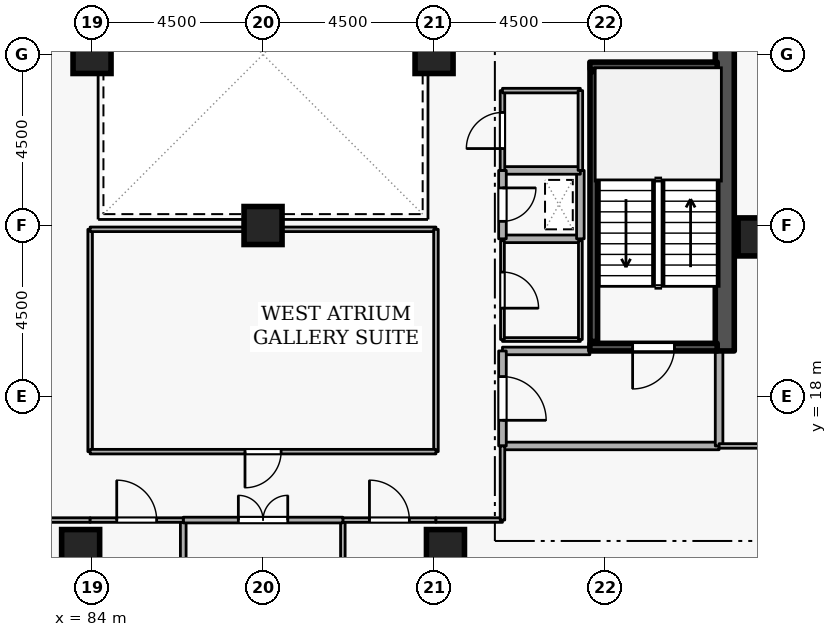
"""IFC4 building model, lengths in metres.
Left out: names, types, materials, properties, quantities, classifications, styles, units other than length and angle.
Written with IfcOpenShell. Run it as: python <this file> out.ifc"""

import sys

from ifc_helpers import new_model, si_unit, direction, frame, frame_2d, origin, origin_2d, place, context, subcontext, project, spatial, rectangle, extrude, element, fill, save


model = new_model("IFC4")
c1 = context("Model", 3, precision=1e-05, world=origin(), true_north=direction((0.0, 1.0)))
c2 = subcontext(c1, "Body", "Model", "MODEL_VIEW")
j1 = project(units=[si_unit("LENGTHUNIT", "METRE"), si_unit("PLANEANGLEUNIT", "RADIAN")], contexts=[c1])
p1 = place(None, origin())
s1 = spatial("IfcSite", under=j1, at=p1, CompositionType="ELEMENT")
p2 = place(p1, origin())
s2 = spatial("IfcBuilding", under=s1, at=p2, CompositionType="ELEMENT")
p3 = place(p2, frame((0.0, 0.0, 233.1)))
s3 = spatial("IfcBuildingStorey", under=s2, at=p3, CompositionType="ELEMENT", Elevation=233.1)
p4 = place(p3, frame((100.65, 19.2, 0.0), z_axis=(0.0, 0.0, 1.0), x_axis=(0.0, 1.0, 0.0)))
e1 = element("IfcWall", 1, at=p4, inside=s3, PredefinedType="SHEAR", context=c2, shape_type="SweptSolid", body=[
    extrude(rectangle(XDim=15.6, YDim=0.5, at=frame_2d((7.8, 0.0))), origin(), (0.0, 0.0, 1.0), 3.6),
])
for number, where, z_axis, x_axis in (
    (2, (93.3, 14.0, 0.0), (0.0, 0.0, 1.0), (1.0, 0.0, 0.0)),
    (3, (83.7, 14.0, 0.0), (0.0, 0.0, 1.0), (1.0, 0.0, 0.0)),
    (4, (101.5, 22.2, 0.0), (0.0, 0.0, 1.0), (1.0, 0.0, 0.0)),
    (5, (93.0, 27.0, 0.0), (0.0, 0.0, 1.0), (1.0, 0.0, 0.0)),
    (6, (84.0, 27.0, 0.0), (0.0, 0.0, 1.0), (1.0, 0.0, 0.0)),
    (7, (88.5, 22.5, 0.0), (0.0, 0.0, 1.0), (1.0, 0.0, 0.0)),
):
    element("IfcColumn", number, at=place(p3, frame(where, z_axis=z_axis, x_axis=x_axis)), inside=s3, PredefinedType="COLUMN", context=c2, shape_type="SweptSolid", body=[
        extrude(rectangle(XDim=1.0, YDim=1.0, at=origin_2d()), origin(), (0.0, 0.0, 1.0), 3.6),
    ])
p5 = place(p3, frame((100.45, 19.3, 0.0), z_axis=(0.0, 0.0, 1.0), x_axis=(-1.0, 0.0, 0.0)))
e8 = element("IfcWall", 8, at=p5, inside=s3, PredefinedType="SHEAR", context=c2, shape_type="SweptSolid", body=[
    extrude(rectangle(XDim=3.35, YDim=0.2, at=frame_2d((1.675, 0.0))), origin(), (0.0, 0.0, 1.0), 3.6),
])
p6 = place(p5, frame((1.125, 0.0, 0.0)))
e9 = element("IfcOpeningElement", 9, at=p6, cuts=e8, PredefinedType="OPENING", context=c2, shape_type="SweptSolid", body=[
    extrude(rectangle(XDim=1.1, YDim=2.1, at=frame_2d((0.55, 1.05))), frame((0.0, 0.11, 0.0), z_axis=(0.0, -1.0, 0.0), x_axis=(1.0, 0.0, 0.0)), (0.0, 0.0, 1.0), 0.22),
])
p7 = place(p3, frame((97.1, 26.7, 0.0), z_axis=(0.0, 0.0, 1.0), x_axis=(1.0, 0.0, 0.0)))
e10 = element("IfcWall", 10, at=p7, inside=s3, PredefinedType="SHEAR", context=c2, shape_type="SweptSolid", body=[
    extrude(rectangle(XDim=3.35, YDim=0.2, at=frame_2d((1.675, 0.0))), origin(), (0.0, 0.0, 1.0), 3.6),
])
p8 = place(p3, frame((97.203, 26.55, 0.0), z_axis=(0.0, 0.0, 1.0), x_axis=(0.0, -1.0, 0.0)))
e11 = element("IfcWall", 11, at=p8, inside=s3, PredefinedType="SHEAR", context=c2, shape_type="SweptSolid", body=[
    extrude(rectangle(XDim=7.1, YDim=0.2, at=frame_2d((3.55, 0.0))), origin(), (0.0, 0.0, 1.0), 3.6),
])
p9 = place(p3, frame((94.8, 16.7, 0.0), z_axis=(0.0, 0.0, 1.0), x_axis=(1.0, 0.0, 0.0)))
e12 = element("IfcWall", 12, at=p9, inside=s3, PredefinedType="STANDARD", context=c2, shape_type="SweptSolid", body=[
    extrude(rectangle(XDim=5.7, YDim=0.2, at=frame_2d((2.85, 0.0))), origin(), (0.0, 0.0, 1.0), 3.34),
])
p10 = place(p3, frame((100.5, 16.7, 0.0), z_axis=(0.0, 0.0, 1.0), x_axis=(0.0, 1.0, 0.0)))
e13 = element("IfcWall", 13, at=p10, inside=s3, PredefinedType="STANDARD", context=c2, shape_type="SweptSolid", body=[
    extrude(rectangle(XDim=2.5, YDim=0.2, at=frame_2d((1.25, 0.0))), origin(), (0.0, 0.0, 1.0), 3.34),
])
p11 = place(p3, frame((97.1, 19.2, 0.0), z_axis=(0.0, 0.0, 1.0), x_axis=(-1.0, 0.0, 0.0)))
e14 = element("IfcWall", 14, at=p11, inside=s3, PredefinedType="STANDARD", context=c2, shape_type="SweptSolid", body=[
    extrude(rectangle(XDim=2.3, YDim=0.2, at=frame_2d((1.15, 0.0))), origin(), (0.0, 0.0, 1.0), 2.545),
])
p12 = place(p3, frame((94.8, 19.2, 0.0), z_axis=(0.0, 0.0, 1.0), x_axis=(0.0, -1.0, 0.0)))
e15 = element("IfcWall", 15, at=p12, inside=s3, PredefinedType="STANDARD", context=c2, shape_type="SweptSolid", body=[
    extrude(rectangle(XDim=2.5, YDim=0.2, at=frame_2d((1.25, 0.0))), origin(), (0.0, 0.0, 1.0), 3.34),
])
p13 = place(p12, frame((0.675, 0.0, 0.0)))
e16 = element("IfcOpeningElement", 16, at=p13, cuts=e15, PredefinedType="OPENING", context=c2, shape_type="SweptSolid", body=[
    extrude(rectangle(XDim=1.15, YDim=2.1, at=frame_2d((0.575, 1.05))), frame((0.0, 0.11, 0.0), z_axis=(0.0, -1.0, 0.0), x_axis=(1.0, 0.0, 0.0)), (0.0, 0.0, 1.0), 0.22),
])
p14 = place(p3, frame((94.8, 22.15, 0.0), z_axis=(0.0, 0.0, 1.0), x_axis=(1.0, 0.0, 0.0)))
e17 = element("IfcWall", 17, at=p14, inside=s3, PredefinedType="STANDARD", context=c2, shape_type="SweptSolid", body=[
    extrude(rectangle(XDim=2.05, YDim=0.2, at=frame_2d((1.025, 0.0))), origin(), (0.0, 0.0, 1.0), 3.34),
])
p15 = place(p3, frame((96.85, 22.15, 0.0), z_axis=(0.0, 0.0, 1.0), x_axis=(0.0, 1.0, 0.0)))
e18 = element("IfcWall", 18, at=p15, inside=s3, PredefinedType="STANDARD", context=c2, shape_type="SweptSolid", body=[
    extrude(rectangle(XDim=1.8, YDim=0.2, at=frame_2d((0.9, 0.0))), origin(), (0.0, 0.0, 1.0), 3.34),
])
p16 = place(p3, frame((96.85, 23.95, 0.0), z_axis=(0.0, 0.0, 1.0), x_axis=(-1.0, 0.0, 0.0)))
e19 = element("IfcWall", 19, at=p16, inside=s3, PredefinedType="STANDARD", context=c2, shape_type="SweptSolid", body=[
    extrude(rectangle(XDim=2.05, YDim=0.2, at=frame_2d((1.025, 0.0))), origin(), (0.0, 0.0, 1.0), 3.34),
])
p17 = place(p3, frame((94.8, 23.95, 0.0), z_axis=(0.0, 0.0, 1.0), x_axis=(0.0, -1.0, 0.0)))
e20 = element("IfcWall", 20, at=p17, inside=s3, PredefinedType="STANDARD", context=c2, shape_type="SweptSolid", body=[
    extrude(rectangle(XDim=1.8, YDim=0.2, at=frame_2d((0.9, 0.0))), origin(), (0.0, 0.0, 1.0), 3.34),
])
p18 = place(p17, frame((0.46, 0.0, 0.0)))
e21 = element("IfcOpeningElement", 21, at=p18, cuts=e20, PredefinedType="OPENING", context=c2, shape_type="SweptSolid", body=[
    extrude(rectangle(XDim=0.88, YDim=2.04, at=frame_2d((0.44, 1.02))), frame((0.0, 0.11, 0.0), z_axis=(0.0, -1.0, 0.0), x_axis=(1.0, 0.0, 0.0)), (0.0, 0.0, 1.0), 0.22),
])
p19 = place(p3, frame((94.8, 19.5, 0.0), z_axis=(0.0, 0.0, 1.0), x_axis=(1.0, 0.0, 0.0)))
e22 = element("IfcWall", 22, at=p19, inside=s3, PredefinedType="PARTITIONING", context=c2, shape_type="SweptSolid", body=[
    extrude(rectangle(XDim=2.05, YDim=0.1, at=frame_2d((1.025, 0.0))), origin(), (0.0, 0.0, 1.0), 2.545),
])
p20 = place(p3, frame((96.85, 19.5, 0.0), z_axis=(0.0, 0.0, 1.0), x_axis=(0.0, 1.0, 0.0)))
e23 = element("IfcWall", 23, at=p20, inside=s3, PredefinedType="PARTITIONING", context=c2, shape_type="SweptSolid", body=[
    extrude(rectangle(XDim=2.6, YDim=0.1, at=frame_2d((1.3, 0.0))), origin(), (0.0, 0.0, 1.0), 3.34),
])
p21 = place(p3, frame((94.8, 22.1, 0.0), z_axis=(0.0, 0.0, 1.0), x_axis=(0.0, -1.0, 0.0)))
e24 = element("IfcWall", 24, at=p21, inside=s3, PredefinedType="PARTITIONING", context=c2, shape_type="SweptSolid", body=[
    extrude(rectangle(XDim=2.6, YDim=0.1, at=frame_2d((1.3, 0.0))), origin(), (0.0, 0.0, 1.0), 3.34),
])
p22 = place(p21, frame((0.825, 0.0, 0.0)))
e25 = element("IfcOpeningElement", 25, at=p22, cuts=e24, PredefinedType="OPENING", context=c2, shape_type="SweptSolid", body=[
    extrude(rectangle(XDim=0.95, YDim=2.1, at=frame_2d((0.475, 1.05))), frame((0.0, 0.06, 0.0), z_axis=(0.0, -1.0, 0.0), x_axis=(1.0, 0.0, 0.0)), (0.0, 0.0, 1.0), 0.12),
])
p23 = place(p3, frame((94.8, 23.95, 0.0), z_axis=(0.0, 0.0, 1.0), x_axis=(0.0, 1.0, 0.0)))
e26 = element("IfcWall", 26, at=p23, inside=s3, PredefinedType="PARTITIONING", context=c2, shape_type="SweptSolid", body=[
    extrude(rectangle(XDim=2.1, YDim=0.12, at=frame_2d((1.05, 0.0))), origin(), (0.0, 0.0, 1.0), 3.34),
])
p24 = place(p23, frame((0.575, 0.0, 0.0)))
e27 = element("IfcOpeningElement", 27, at=p24, cuts=e26, PredefinedType="OPENING", context=c2, shape_type="SweptSolid", body=[
    extrude(rectangle(XDim=0.95, YDim=2.1, at=frame_2d((0.475, 1.05))), frame((0.0, 0.07, 0.0), z_axis=(0.0, -1.0, 0.0), x_axis=(1.0, 0.0, 0.0)), (0.0, 0.0, 1.0), 0.14),
])
p25 = place(p3, frame((94.8, 26.05, 0.0), z_axis=(0.0, 0.0, 1.0), x_axis=(1.0, 0.0, 0.0)))
e28 = element("IfcWall", 28, at=p25, inside=s3, PredefinedType="PARTITIONING", context=c2, shape_type="SweptSolid", body=[
    extrude(rectangle(XDim=2.05, YDim=0.12, at=frame_2d((1.025, 0.0))), origin(), (0.0, 0.0, 1.0), 3.34),
])
p26 = place(p3, frame((96.85, 26.05, 0.0), z_axis=(0.0, 0.0, 1.0), x_axis=(0.0, -1.0, 0.0)))
e29 = element("IfcWall", 29, at=p26, inside=s3, PredefinedType="PARTITIONING", context=c2, shape_type="SweptSolid", body=[
    extrude(rectangle(XDim=2.1, YDim=0.12, at=frame_2d((1.05, 0.0))), origin(), (0.0, 0.0, 1.0), 3.34),
])
p27 = place(p3, frame((90.6, 3.28, 0.0), z_axis=(0.0, 0.0, 1.0), x_axis=(0.0, 1.0, 0.0)))
e30 = element("IfcWall", 30, at=p27, inside=s3, PredefinedType="PARTITIONING", context=c2, shape_type="SweptSolid", body=[
    extrude(rectangle(XDim=11.47, YDim=0.12, at=frame_2d((5.735, 0.0))), origin(), (0.0, 0.0, 1.0), 3.34),
])
p28 = place(p3, frame((90.6, 14.75, 0.0), z_axis=(0.0, 0.0, 1.0), x_axis=(1.0, 0.0, 0.0)))
e31 = element("IfcWall", 31, at=p28, inside=s3, PredefinedType="PARTITIONING", context=c2, shape_type="SweptSolid", body=[
    extrude(rectangle(XDim=2.45, YDim=0.12, at=frame_2d((1.225, 0.0))), origin(), (0.0, 0.0, 1.0), 3.34),
])
p29 = place(p28, frame((0.7, 0.0, 0.0)))
e32 = element("IfcOpeningElement", 32, at=p29, cuts=e31, PredefinedType="OPENING", context=c2, shape_type="SweptSolid", body=[
    extrude(rectangle(XDim=1.05, YDim=2.1, at=frame_2d((0.525, 1.05))), frame((0.0, 0.07, 0.0), z_axis=(0.0, -1.0, 0.0), x_axis=(1.0, 0.0, 0.0)), (0.0, 0.0, 1.0), 0.14),
])
p30 = place(p3, frame((93.05, 14.75, 0.0), z_axis=(0.0, 0.0, 1.0), x_axis=(1.0, 0.0, 0.0)))
e33 = element("IfcWall", 33, at=p30, inside=s3, PredefinedType="PARTITIONING", context=c2, shape_type="SweptSolid", body=[
    extrude(rectangle(XDim=1.75, YDim=0.12, at=frame_2d((0.875, 0.0))), origin(), (0.0, 0.0, 1.0), 3.34),
])
p31 = place(p3, frame((94.8, 14.75, 0.0), z_axis=(0.0, 0.0, 1.0), x_axis=(0.0, 1.0, 0.0)))
e34 = element("IfcWall", 34, at=p31, inside=s3, PredefinedType="PARTITIONING", context=c2, shape_type="SweptSolid", body=[
    extrude(rectangle(XDim=1.95, YDim=0.12, at=frame_2d((0.975, 0.0))), origin(), (0.0, 0.0, 1.0), 3.34),
])
p32 = place(p3, frame((100.5, 16.7, 0.0), z_axis=(0.0, 0.0, 1.0), x_axis=(1.0, 0.0, 0.0)))
e35 = element("IfcWall", 35, at=p32, inside=s3, PredefinedType="PARTITIONING", context=c2, shape_type="SweptSolid", body=[
    extrude(rectangle(XDim=11.72, YDim=0.12, at=frame_2d((5.86, 0.0))), origin(), (0.0, 0.0, 1.0), 3.34),
])
p33 = place(p3, frame((86.4, 3.28, 0.0), z_axis=(0.0, 0.0, 1.0), x_axis=(0.0, 1.0, 0.0)))
e36 = element("IfcWall", 36, at=p33, inside=s3, PredefinedType="PARTITIONING", context=c2, shape_type="SweptSolid", body=[
    extrude(rectangle(XDim=11.47, YDim=0.15, at=frame_2d((5.735, 0.0))), origin(), (0.0, 0.0, 1.0), 3.34),
])
p34 = place(p3, frame((86.4, 14.75, 0.0), z_axis=(0.0, 0.0, 1.0), x_axis=(1.0, 0.0, 0.0)))
e37 = element("IfcWall", 37, at=p34, inside=s3, PredefinedType="PARTITIONING", context=c2, shape_type="SweptSolid", body=[
    extrude(rectangle(XDim=4.2, YDim=0.15, at=frame_2d((2.1, 0.0))), origin(), (0.0, 0.0, 1.0), 3.34),
])
p35 = place(p34, frame((1.45, 0.0, 0.0)))
e38 = element("IfcOpeningElement", 38, at=p35, cuts=e37, PredefinedType="OPENING", context=c2, shape_type="SweptSolid", body=[
    extrude(rectangle(XDim=1.3, YDim=2.12, at=frame_2d((0.65, 1.06))), frame((0.0, 0.085, 0.0), z_axis=(0.0, -1.0, 0.0), x_axis=(1.0, 0.0, 0.0)), (0.0, 0.0, 1.0), 0.17),
])
p36 = place(p3, frame((82.2, 14.75, 0.0), z_axis=(0.0, 0.0, 1.0), x_axis=(1.0, 0.0, 0.0)))
e39 = element("IfcWall", 39, at=p36, inside=s3, PredefinedType="PARTITIONING", context=c2, shape_type="SweptSolid", body=[
    extrude(rectangle(XDim=1.75, YDim=0.12, at=frame_2d((0.875, 0.0))), origin(), (0.0, 0.0, 1.0), 3.34),
])
p37 = place(p3, frame((83.95, 14.75, 0.0), z_axis=(0.0, 0.0, 1.0), x_axis=(1.0, 0.0, 0.0)))
e40 = element("IfcWall", 40, at=p37, inside=s3, PredefinedType="PARTITIONING", context=c2, shape_type="SweptSolid", body=[
    extrude(rectangle(XDim=2.45, YDim=0.12, at=frame_2d((1.225, 0.0))), origin(), (0.0, 0.0, 1.0), 3.34),
])
p38 = place(p37, frame((0.7, 0.0, 0.0)))
e41 = element("IfcOpeningElement", 41, at=p38, cuts=e40, PredefinedType="OPENING", context=c2, shape_type="SweptSolid", body=[
    extrude(rectangle(XDim=1.05, YDim=2.1, at=frame_2d((0.525, 1.05))), frame((0.0, 0.07, 0.0), z_axis=(0.0, -1.0, 0.0), x_axis=(1.0, 0.0, 0.0)), (0.0, 0.0, 1.0), 0.14),
])
p39 = place(p3, frame((83.95, 16.55, 0.0), z_axis=(0.0, 0.0, 1.0), x_axis=(0.0, 1.0, 0.0)))
e42 = element("IfcWall", 42, at=p39, inside=s3, PredefinedType="PARTITIONING", context=c2, shape_type="SweptSolid", body=[
    extrude(rectangle(XDim=5.85, YDim=0.12, at=frame_2d((2.925, 0.0))), origin(), (0.0, 0.0, 1.0), 3.34),
])
p40 = place(p3, frame((83.95, 22.4, 0.0), z_axis=(0.0, 0.0, 1.0), x_axis=(1.0, 0.0, 0.0)))
e43 = element("IfcWall", 43, at=p40, inside=s3, PredefinedType="PARTITIONING", context=c2, shape_type="SweptSolid", body=[
    extrude(rectangle(XDim=9.1, YDim=0.12, at=frame_2d((4.55, 0.0))), origin(), (0.0, 0.0, 1.0), 3.34),
])
p41 = place(p3, frame((93.05, 22.4, 0.0), z_axis=(0.0, 0.0, 1.0), x_axis=(0.0, -1.0, 0.0)))
e44 = element("IfcWall", 44, at=p41, inside=s3, PredefinedType="PARTITIONING", context=c2, shape_type="SweptSolid", body=[
    extrude(rectangle(XDim=5.85, YDim=0.12, at=frame_2d((2.925, 0.0))), origin(), (0.0, 0.0, 1.0), 3.34),
])
p42 = place(p3, frame((93.05, 16.55, 0.0), z_axis=(0.0, 0.0, 1.0), x_axis=(-1.0, 0.0, 0.0)))
e45 = element("IfcWall", 45, at=p42, inside=s3, PredefinedType="PARTITIONING", context=c2, shape_type="SweptSolid", body=[
    extrude(rectangle(XDim=9.1, YDim=0.12, at=frame_2d((4.55, 0.0))), origin(), (0.0, 0.0, 1.0), 3.34),
])
p43 = place(p42, frame((4.075, 0.0, 0.0)))
e46 = element("IfcOpeningElement", 46, at=p43, cuts=e45, PredefinedType="OPENING", context=c2, shape_type="SweptSolid", body=[
    extrude(rectangle(XDim=0.95, YDim=2.1, at=frame_2d((0.475, 1.05))), frame((0.0, 0.07, 0.0), z_axis=(0.0, -1.0, 0.0), x_axis=(1.0, 0.0, 0.0)), (0.0, 0.0, 1.0), 0.14),
])
p44 = place(p6, origin())
e47 = element("IfcDoor", 47, at=p44, inside=s3, OperationType="SINGLE_SWING_RIGHT", PredefinedType="DOOR", context=c2, shape_type="SweptSolid", body=[
    extrude(rectangle(XDim=1.1, YDim=2.1, at=frame_2d((0.55, 1.05))), frame((0.0, 0.025, 0.0), z_axis=(0.0, -1.0, 0.0), x_axis=(1.0, 0.0, 0.0)), (0.0, 0.0, 1.0), 0.05),
])
fill(e9, e47)
p45 = place(p13, origin())
e48 = element("IfcDoor", 48, at=p45, inside=s3, OperationType="SINGLE_SWING_RIGHT", PredefinedType="DOOR", context=c2, shape_type="SweptSolid", body=[
    extrude(rectangle(XDim=1.15, YDim=2.1, at=frame_2d((0.575, 1.05))), frame((0.0, 0.025, 0.0), z_axis=(0.0, -1.0, 0.0), x_axis=(1.0, 0.0, 0.0)), (0.0, 0.0, 1.0), 0.05),
])
fill(e16, e48)
p46 = place(p18, origin())
e49 = element("IfcDoor", 49, at=p46, inside=s3, OperationType="SINGLE_SWING_LEFT", PredefinedType="DOOR", context=c2, shape_type="SweptSolid", body=[
    extrude(rectangle(XDim=0.88, YDim=2.04, at=frame_2d((0.44, 1.02))), frame((0.0, 0.025, 0.0), z_axis=(0.0, -1.0, 0.0), x_axis=(1.0, 0.0, 0.0)), (0.0, 0.0, 1.0), 0.05),
])
fill(e21, e49)
p47 = place(p22, origin())
e50 = element("IfcDoor", 50, at=p47, inside=s3, OperationType="SINGLE_SWING_RIGHT", PredefinedType="DOOR", context=c2, shape_type="SweptSolid", body=[
    extrude(rectangle(XDim=0.95, YDim=2.1, at=frame_2d((0.475, 1.05))), frame((0.0, 0.025, 0.0), z_axis=(0.0, -1.0, 0.0), x_axis=(1.0, 0.0, 0.0)), (0.0, 0.0, 1.0), 0.05),
])
fill(e25, e50)
p48 = place(p24, origin())
e51 = element("IfcDoor", 51, at=p48, inside=s3, OperationType="SINGLE_SWING_LEFT", PredefinedType="DOOR", context=c2, shape_type="SweptSolid", body=[
    extrude(rectangle(XDim=0.95, YDim=2.1, at=frame_2d((0.475, 1.05))), frame((0.0, 0.025, 0.0), z_axis=(0.0, -1.0, 0.0), x_axis=(1.0, 0.0, 0.0)), (0.0, 0.0, 1.0), 0.05),
])
fill(e27, e51)
p49 = place(p29, origin())
e52 = element("IfcDoor", 52, at=p49, inside=s3, OperationType="SINGLE_SWING_LEFT", PredefinedType="DOOR", context=c2, shape_type="SweptSolid", body=[
    extrude(rectangle(XDim=1.05, YDim=2.1, at=frame_2d((0.525, 1.05))), frame((0.0, 0.025, 0.0), z_axis=(0.0, -1.0, 0.0), x_axis=(1.0, 0.0, 0.0)), (0.0, 0.0, 1.0), 0.05),
])
fill(e32, e52)
p50 = place(p35, origin())
e53 = element("IfcDoor", 53, at=p50, inside=s3, OperationType="DOUBLE_DOOR_SINGLE_SWING", PredefinedType="DOOR", context=c2, shape_type="SweptSolid", body=[
    extrude(rectangle(XDim=1.3, YDim=2.12, at=frame_2d((0.65, 1.06))), frame((0.0, 0.025, 0.0), z_axis=(0.0, -1.0, 0.0), x_axis=(1.0, 0.0, 0.0)), (0.0, 0.0, 1.0), 0.05),
])
fill(e38, e53)
p51 = place(p38, origin())
e54 = element("IfcDoor", 54, at=p51, inside=s3, OperationType="SINGLE_SWING_LEFT", PredefinedType="DOOR", context=c2, shape_type="SweptSolid", body=[
    extrude(rectangle(XDim=1.05, YDim=2.1, at=frame_2d((0.525, 1.05))), frame((0.0, 0.025, 0.0), z_axis=(0.0, -1.0, 0.0), x_axis=(1.0, 0.0, 0.0)), (0.0, 0.0, 1.0), 0.05),
])
fill(e41, e54)
p52 = place(p43, origin())
e55 = element("IfcDoor", 55, at=p52, inside=s3, OperationType="SINGLE_SWING_RIGHT", PredefinedType="DOOR", context=c2, shape_type="SweptSolid", body=[
    extrude(rectangle(XDim=0.95, YDim=2.1, at=frame_2d((0.475, 1.05))), frame((0.0, 0.025, 0.0), z_axis=(0.0, -1.0, 0.0), x_axis=(1.0, 0.0, 0.0)), (0.0, 0.0, 1.0), 0.05),
])
fill(e46, e55)
save(model, sys.argv[1])
